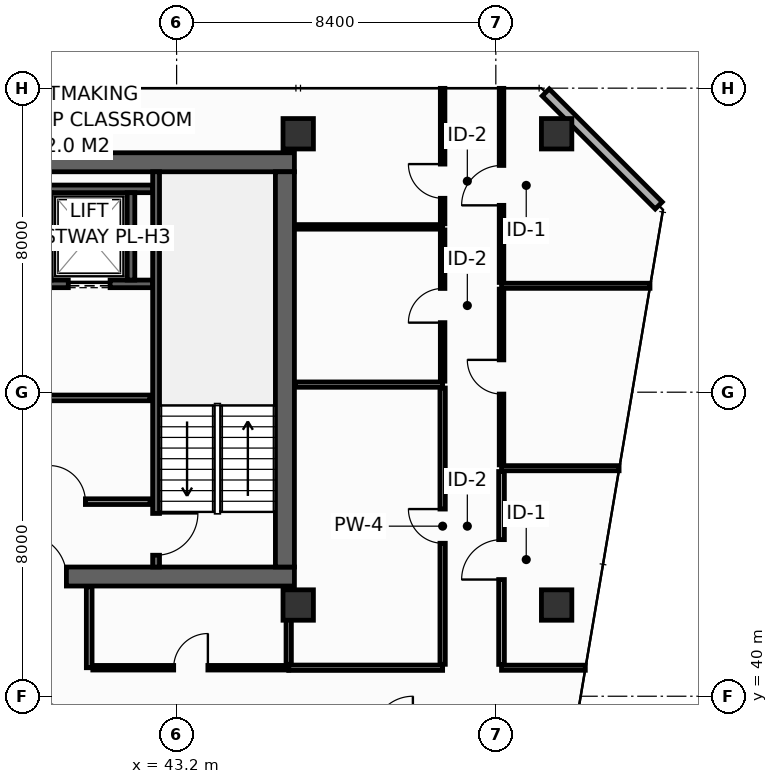
"""IFC4 building model, lengths in metres.
Left out: names, types, materials, properties, quantities, classifications, styles, units other than length and angle.
Written with IfcOpenShell. Run it as: python <this file> out.ifc"""

import sys

from ifc_helpers import new_model, si_unit, direction, frame, frame_2d, origin, origin_2d, place, context, subcontext, project, spatial, rectangle, hollow_rectangle, extrude, element, fill, save


model = new_model("IFC4")
c1 = context("Model", 3, precision=1e-05, world=origin(), true_north=direction((0.0, 1.0)))
c2 = subcontext(c1, "Body", "Model", "MODEL_VIEW")
j1 = project(units=[si_unit("LENGTHUNIT", "METRE"), si_unit("PLANEANGLEUNIT", "RADIAN")], contexts=[c1])
p1 = place(None, origin())
s1 = spatial("IfcSite", under=j1, at=p1, CompositionType="ELEMENT")
p2 = place(p1, origin())
s2 = spatial("IfcBuilding", under=s1, at=p2, CompositionType="ELEMENT")
p3 = place(p2, frame((0.0, 0.0, 220.8)))
s3 = spatial("IfcBuildingStorey", under=s2, at=p3, CompositionType="ELEMENT", Elevation=220.8)
p4 = place(p3, frame((13.6, 43.15, 0.0), z_axis=(0.0, 0.0, 1.0), x_axis=(1.0, 0.0, 0.0)))
e1 = element("IfcWall", 1, at=p4, inside=s3, PredefinedType="SHEAR", context=c2, shape_type="SweptSolid", body=[
    extrude(rectangle(XDim=32.7, YDim=0.5, at=frame_2d((16.35, 0.0))), origin(), (0.0, 0.0, 1.0), 3.35),
])
p5 = place(p4, frame((5.4, 0.0, 0.0)))
e2 = element("IfcOpeningElement", 2, at=p5, cuts=e1, PredefinedType="OPENING", context=c2, shape_type="SweptSolid", body=[
    extrude(rectangle(XDim=1.1, YDim=2.15, at=frame_2d((0.55, 1.075))), frame((0.0, 0.26, 0.0), z_axis=(0.0, -1.0, 0.0), x_axis=(1.0, 0.0, 0.0)), (0.0, 0.0, 1.0), 0.52),
])
p6 = place(p4, frame((25.6, 0.0, 0.0)))
e3 = element("IfcOpeningElement", 3, at=p6, cuts=e1, PredefinedType="OPENING", context=c2, shape_type="SweptSolid", body=[
    extrude(rectangle(XDim=1.1, YDim=2.15, at=frame_2d((0.55, 1.075))), frame((0.0, 0.26, 0.0), z_axis=(0.0, -1.0, 0.0), x_axis=(1.0, 0.0, 0.0)), (0.0, 0.0, 1.0), 0.52),
])
p7 = place(p3, frame((13.6, 54.05, 0.0), z_axis=(0.0, 0.0, 1.0), x_axis=(1.0, 0.0, 0.0)))
e4 = element("IfcWall", 4, at=p7, inside=s3, PredefinedType="SHEAR", context=c2, shape_type="SweptSolid", body=[
    extrude(rectangle(XDim=32.7, YDim=0.5, at=frame_2d((16.35, 0.0))), origin(), (0.0, 0.0, 1.0), 3.35),
])
p8 = place(p3, frame((46.05, 43.4, 0.0), z_axis=(0.0, 0.0, 1.0), x_axis=(0.0, 1.0, 0.0)))
e5 = element("IfcWall", 5, at=p8, inside=s3, PredefinedType="SHEAR", context=c2, shape_type="SweptSolid", body=[
    extrude(rectangle(XDim=10.4, YDim=0.5, at=frame_2d((5.2, 0.0))), origin(), (0.0, 0.0, 1.0), 3.35),
])
for number, where, z_axis, x_axis in (
    (6, (46.4, 54.8, 0.0), (0.0, 0.0, 1.0), (1.0, 0.0, 0.0)),
    (7, (53.2, 54.8, 0.0), (0.0, 0.0, 1.0), (1.0, 0.0, 0.0)),
    (8, (46.4, 42.4, 0.0), (0.0, 0.0, 1.0), (1.0, 0.0, 0.0)),
    (9, (53.2, 42.4, 0.0), (0.0, 0.0, 1.0), (1.0, 0.0, 0.0)),
):
    element("IfcColumn", number, at=place(p3, frame(where, z_axis=z_axis, x_axis=x_axis)), inside=s3, PredefinedType="COLUMN", context=c2, shape_type="SweptSolid", body=[
        extrude(hollow_rectangle(XDim=0.8, YDim=0.8, WallThickness=0.036, at=origin_2d()), origin(), (0.0, 0.0, 1.0), 3.8),
    ])
p9 = place(p3, frame((39.525, 50.85, 0.0), z_axis=(0.0, 0.0, 1.0), x_axis=(1.0, 0.0, 0.0)))
e10 = element("IfcWall", 10, at=p9, inside=s3, PredefinedType="SHEAR", context=c2, shape_type="SweptSolid", body=[
    extrude(rectangle(XDim=3.045, YDim=0.2, at=frame_2d((1.522, 0.0))), origin(), (0.0, 0.0, 1.0), 3.35),
])
p10 = place(p9, frame((0.825, 0.0, 0.0)))
e11 = element("IfcOpeningElement", 11, at=p10, cuts=e10, PredefinedType="OPENING", context=c2, shape_type="SweptSolid", body=[
    extrude(rectangle(XDim=1.1, YDim=2.2, at=frame_2d((0.55, 1.1))), frame((0.0, 0.11, 0.0), z_axis=(0.0, -1.0, 0.0), x_axis=(1.0, 0.0, 0.0)), (0.0, 0.0, 1.0), 0.22),
])
p11 = place(p3, frame((39.525, 53.35, 0.0), z_axis=(0.0, 0.0, 1.0), x_axis=(1.0, 0.0, 0.0)))
e12 = element("IfcWall", 12, at=p11, inside=s3, PredefinedType="SHEAR", context=c2, shape_type="SweptSolid", body=[
    extrude(rectangle(XDim=3.045, YDim=0.2, at=frame_2d((1.522, 0.0))), origin(), (0.0, 0.0, 1.0), 3.35),
])
p12 = place(p3, frame((42.0, 50.95, 0.0), z_axis=(0.0, 0.0, 1.0), x_axis=(0.0, 1.0, 0.0)))
e13 = element("IfcWall", 13, at=p12, inside=s3, PredefinedType="SHEAR", context=c2, shape_type="SweptSolid", body=[
    extrude(rectangle(XDim=2.3, YDim=0.2, at=frame_2d((1.15, 0.0))), origin(), (0.0, 0.0, 1.0), 3.35),
])
p13 = place(p3, frame((42.66, 53.8, 0.0), z_axis=(0.0, 0.0, 1.0), x_axis=(0.0, -1.0, 0.0)))
e14 = element("IfcWall", 14, at=p13, inside=s3, PredefinedType="SHEAR", context=c2, shape_type="SweptSolid", body=[
    extrude(rectangle(XDim=10.4, YDim=0.18, at=frame_2d((5.2, 0.0))), origin(), (0.0, 0.0, 1.0), 3.35),
])
p14 = place(p13, frame((8.99, 0.0, 0.0)))
e15 = element("IfcOpeningElement", 15, at=p14, cuts=e14, PredefinedType="OPENING", context=c2, shape_type="SweptSolid", body=[
    extrude(rectangle(XDim=1.1, YDim=2.15, at=frame_2d((0.55, 1.075))), frame((0.0, 0.1, 0.0), z_axis=(0.0, -1.0, 0.0), x_axis=(1.0, 0.0, 0.0)), (0.0, 0.0, 1.0), 0.2),
])
p15 = place(p3, frame((34.05, 45.12, 0.0), z_axis=(0.0, 0.0, 1.0), x_axis=(1.0, 0.0, 0.0)))
e16 = element("IfcWall", 16, at=p15, inside=s3, PredefinedType="PARTITIONING", context=c2, shape_type="SweptSolid", body=[
    extrude(rectangle(XDim=8.45, YDim=0.15, at=frame_2d((4.225, 0.0))), origin(), (0.0, 0.0, 1.0), 3.35),
])
p16 = place(p15, frame((1.5, 0.0, 0.0)))
e17 = element("IfcOpeningElement", 17, at=p16, cuts=e16, PredefinedType="OPENING", context=c2, shape_type="SweptSolid", body=[
    extrude(rectangle(XDim=0.95, YDim=2.15, at=frame_2d((0.475, 1.075))), frame((0.0, 0.085, 0.0), z_axis=(0.0, -1.0, 0.0), x_axis=(1.0, 0.0, 0.0)), (0.0, 0.0, 1.0), 0.17),
])
p17 = place(p15, frame((5.8, 0.0, 0.0)))
e18 = element("IfcOpeningElement", 18, at=p17, cuts=e16, PredefinedType="OPENING", context=c2, shape_type="SweptSolid", body=[
    extrude(rectangle(XDim=0.95, YDim=2.15, at=frame_2d((0.475, 1.075))), frame((0.0, 0.085, 0.0), z_axis=(0.0, -1.0, 0.0), x_axis=(1.0, 0.0, 0.0)), (0.0, 0.0, 1.0), 0.17),
])
p18 = place(p3, frame((34.05, 47.85, 0.0), z_axis=(0.0, 0.0, 1.0), x_axis=(1.0, 0.0, 0.0)))
e19 = element("IfcWall", 19, at=p18, inside=s3, PredefinedType="PARTITIONING", context=c2, shape_type="SweptSolid", body=[
    extrude(rectangle(XDim=8.45, YDim=0.15, at=frame_2d((4.225, 0.0))), origin(), (0.0, 0.0, 1.0), 3.35),
])
p19 = place(p3, frame((55.887, 52.913, 0.0), z_axis=(0.0, 0.0, 1.0), x_axis=(-0.707106781187, 0.707106781187, 0.0)))
e20 = element("IfcWall", 20, at=p19, inside=s3, PredefinedType="STANDARD", context=c2, shape_type="SweptSolid", body=[
    extrude(rectangle(XDim=4.206, YDim=0.26, at=frame_2d((2.103, 0.0))), origin(), (0.0, 0.0, 1.0), 3.35),
])
p20 = place(p3, frame((46.15, 40.75, 0.0), z_axis=(0.0, 0.0, 1.0), x_axis=(1.0, 0.0, 0.0)))
e21 = element("IfcWall", 21, at=p20, inside=s3, PredefinedType="PARTITIONING", context=c2, shape_type="SweptSolid", body=[
    extrude(rectangle(XDim=4.05, YDim=0.14, at=frame_2d((2.025, 0.0))), origin(), (0.0, 0.0, 1.0), 3.35),
])
p21 = place(p3, frame((46.15, 40.84, 0.0), z_axis=(0.0, 0.0, 1.0), x_axis=(0.0, 1.0, 0.0)))
e22 = element("IfcWall", 22, at=p21, inside=s3, PredefinedType="PARTITIONING", context=c2, shape_type="SweptSolid", body=[
    extrude(rectangle(XDim=2.04, YDim=0.14, at=frame_2d((1.02, 0.0))), origin(), (0.0, 0.0, 1.0), 3.35),
])
p22 = place(p3, frame((46.32, 48.2, 0.0), z_axis=(0.0, 0.0, 1.0), x_axis=(1.0, 0.0, 0.0)))
e23 = element("IfcWall", 23, at=p22, inside=s3, PredefinedType="PARTITIONING", context=c2, shape_type="SweptSolid", body=[
    extrude(rectangle(XDim=3.88, YDim=0.14, at=frame_2d((1.94, 0.0))), origin(), (0.0, 0.0, 1.0), 3.35),
])
p23 = place(p3, frame((50.2, 40.84, 0.0), z_axis=(0.0, 0.0, 1.0), x_axis=(0.0, 1.0, 0.0)))
e24 = element("IfcWall", 24, at=p23, inside=s3, PredefinedType="PARTITIONING", context=c2, shape_type="SweptSolid", body=[
    extrude(rectangle(XDim=7.27, YDim=0.14, at=frame_2d((3.635, 0.0))), origin(), (0.0, 0.0, 1.0), 2.635),
])
p24 = place(p23, frame((3.185, 0.0, 0.0)))
e25 = element("IfcOpeningElement", 25, at=p24, cuts=e24, PredefinedType="OPENING", context=c2, shape_type="SweptSolid", body=[
    extrude(rectangle(XDim=0.9, YDim=2.1, at=frame_2d((0.45, 1.05))), frame((0.0, 0.08, 0.0), z_axis=(0.0, -1.0, 0.0), x_axis=(1.0, 0.0, 0.0)), (0.0, 0.0, 1.0), 0.16),
])
p25 = place(p3, frame((46.32, 52.35, 0.0), z_axis=(0.0, 0.0, 1.0), x_axis=(1.0, 0.0, 0.0)))
e26 = element("IfcWall", 26, at=p25, inside=s3, PredefinedType="PARTITIONING", context=c2, shape_type="SweptSolid", body=[
    extrude(rectangle(XDim=3.88, YDim=0.12, at=frame_2d((1.94, 0.0))), origin(), (0.0, 0.0, 1.0), 3.35),
])
p26 = place(p3, frame((50.2, 48.29, 0.0), z_axis=(0.0, 0.0, 1.0), x_axis=(0.0, 1.0, 0.0)))
e27 = element("IfcWall", 27, at=p26, inside=s3, PredefinedType="PARTITIONING", context=c2, shape_type="SweptSolid", body=[
    extrude(rectangle(XDim=3.98, YDim=0.12, at=frame_2d((1.99, 0.0))), origin(), (0.0, 0.0, 1.0), 3.35),
])
p27 = place(p26, frame((1.54, 0.0, 0.0)))
e28 = element("IfcOpeningElement", 28, at=p27, cuts=e27, PredefinedType="OPENING", context=c2, shape_type="SweptSolid", body=[
    extrude(rectangle(XDim=0.9, YDim=2.1, at=frame_2d((0.45, 1.05))), frame((0.0, 0.07, 0.0), z_axis=(0.0, -1.0, 0.0), x_axis=(1.0, 0.0, 0.0)), (0.0, 0.0, 1.0), 0.14),
])
p28 = place(p3, frame((50.2, 52.43, 0.0), z_axis=(0.0, 0.0, 1.0), x_axis=(0.0, 1.0, 0.0)))
e29 = element("IfcWall", 29, at=p28, inside=s3, PredefinedType="PARTITIONING", context=c2, shape_type="SweptSolid", body=[
    extrude(rectangle(XDim=3.565, YDim=0.12, at=frame_2d((1.783, 0.0))), origin(), (0.0, 0.0, 1.0), 2.735),
])
p29 = place(p28, frame((0.672, 0.0, 0.0)))
e30 = element("IfcOpeningElement", 30, at=p29, cuts=e29, PredefinedType="OPENING", context=c2, shape_type="SweptSolid", body=[
    extrude(rectangle(XDim=0.9, YDim=2.1, at=frame_2d((0.45, 1.05))), frame((0.0, 0.07, 0.0), z_axis=(0.0, -1.0, 0.0), x_axis=(1.0, 0.0, 0.0)), (0.0, 0.0, 1.0), 0.14),
])
p30 = place(p3, frame((51.75, 40.75, 0.0), z_axis=(0.0, 0.0, 1.0), x_axis=(1.0, 0.0, 0.0)))
e31 = element("IfcWall", 31, at=p30, inside=s3, PredefinedType="PARTITIONING", context=c2, shape_type="SweptSolid", body=[
    extrude(rectangle(XDim=2.205, YDim=0.135, at=frame_2d((1.103, 0.0))), origin(), (0.0, 0.0, 1.0), 2.835),
])
p31 = place(p3, frame((51.75, 46.0, 0.0), z_axis=(0.0, 0.0, 1.0), x_axis=(1.0, 0.0, 0.0)))
e32 = element("IfcWall", 32, at=p31, inside=s3, PredefinedType="PARTITIONING", context=c2, shape_type="SweptSolid", body=[
    extrude(rectangle(XDim=3.094, YDim=0.135, at=frame_2d((1.547, 0.0))), origin(), (0.0, 0.0, 1.0), 2.635),
])
p32 = place(p3, frame((51.75, 50.8, 0.0), z_axis=(0.0, 0.0, 1.0), x_axis=(1.0, 0.0, 0.0)))
e33 = element("IfcWall", 33, at=p32, inside=s3, PredefinedType="PARTITIONING", context=c2, shape_type="SweptSolid", body=[
    extrude(rectangle(XDim=3.906, YDim=0.135, at=frame_2d((1.953, 0.0))), origin(), (0.0, 0.0, 1.0), 2.635),
])
p33 = place(p3, frame((51.75, 40.837, 0.0), z_axis=(0.0, 0.0, 1.0), x_axis=(0.0, 1.0, 0.0)))
e34 = element("IfcWall", 34, at=p33, inside=s3, PredefinedType="PARTITIONING", context=c2, shape_type="SweptSolid", body=[
    extrude(rectangle(XDim=5.075, YDim=0.15, at=frame_2d((2.538, 0.0))), origin(), (0.0, 0.0, 1.0), 2.635),
])
p34 = place(p33, frame((2.233, 0.0, 0.0)))
e35 = element("IfcOpeningElement", 35, at=p34, cuts=e34, PredefinedType="OPENING", context=c2, shape_type="SweptSolid", body=[
    extrude(rectangle(XDim=1.05, YDim=2.15, at=frame_2d((0.525, 1.075))), frame((0.0, 0.085, 0.0), z_axis=(0.0, -1.0, 0.0), x_axis=(1.0, 0.0, 0.0)), (0.0, 0.0, 1.0), 0.17),
])
p35 = place(p3, frame((51.75, 46.087, 0.0), z_axis=(0.0, 0.0, 1.0), x_axis=(0.0, 1.0, 0.0)))
e36 = element("IfcWall", 36, at=p35, inside=s3, PredefinedType="PARTITIONING", context=c2, shape_type="SweptSolid", body=[
    extrude(rectangle(XDim=4.625, YDim=0.12, at=frame_2d((2.312, 0.0))), origin(), (0.0, 0.0, 1.0), 3.35),
])
p36 = place(p35, frame((1.863, 0.0, 0.0)))
e37 = element("IfcOpeningElement", 37, at=p36, cuts=e36, PredefinedType="OPENING", context=c2, shape_type="SweptSolid", body=[
    extrude(rectangle(XDim=0.9, YDim=2.1, at=frame_2d((0.45, 1.05))), frame((0.0, 0.07, 0.0), z_axis=(0.0, -1.0, 0.0), x_axis=(1.0, 0.0, 0.0)), (0.0, 0.0, 1.0), 0.14),
])
p37 = place(p3, frame((51.75, 50.887, 0.0), z_axis=(0.0, 0.0, 1.0), x_axis=(0.0, 1.0, 0.0)))
e38 = element("IfcWall", 38, at=p37, inside=s3, PredefinedType="PARTITIONING", context=c2, shape_type="SweptSolid", body=[
    extrude(rectangle(XDim=5.108, YDim=0.12, at=frame_2d((2.554, 0.0))), origin(), (0.0, 0.0, 1.0), 2.735),
])
p38 = place(p37, frame((2.029, 0.0, 0.0)))
e39 = element("IfcOpeningElement", 39, at=p38, cuts=e38, PredefinedType="OPENING", context=c2, shape_type="SweptSolid", body=[
    extrude(rectangle(XDim=1.05, YDim=2.15, at=frame_2d((0.525, 1.075))), frame((0.0, 0.07, 0.0), z_axis=(0.0, -1.0, 0.0), x_axis=(1.0, 0.0, 0.0)), (0.0, 0.0, 1.0), 0.14),
])
p39 = place(p3, frame((40.9, 40.75, 0.0), z_axis=(0.0, 0.0, 1.0), x_axis=(0.0, 1.0, 0.0)))
e40 = element("IfcWall", 40, at=p39, inside=s3, PredefinedType="PARTITIONING", context=c2, shape_type="SweptSolid", body=[
    extrude(rectangle(XDim=2.13, YDim=0.15, at=frame_2d((1.065, 0.0))), origin(), (0.0, 0.0, 1.0), 3.35),
])
p40 = place(p3, frame((40.995, 40.75, 0.0), z_axis=(0.0, 0.0, 1.0), x_axis=(1.0, 0.0, 0.0)))
e41 = element("IfcWall", 41, at=p40, inside=s3, PredefinedType="PARTITIONING", context=c2, shape_type="SweptSolid", body=[
    extrude(rectangle(XDim=5.155, YDim=0.12, at=frame_2d((2.577, 0.0))), origin(), (0.0, 0.0, 1.0), 3.35),
])
p41 = place(p40, frame((2.128, 0.0, 0.0)))
e42 = element("IfcOpeningElement", 42, at=p41, cuts=e41, PredefinedType="OPENING", context=c2, shape_type="SweptSolid", body=[
    extrude(rectangle(XDim=0.9, YDim=2.1, at=frame_2d((0.45, 1.05))), frame((0.0, 0.07, 0.0), z_axis=(0.0, -1.0, 0.0), x_axis=(1.0, 0.0, 0.0)), (0.0, 0.0, 1.0), 0.14),
])
p42 = place(p10, origin())
e43 = element("IfcDoor", 43, at=p42, inside=s3, OperationType="SLIDING_TO_LEFT", PredefinedType="DOOR", context=c2, shape_type="SweptSolid", body=[
    extrude(rectangle(XDim=1.1, YDim=2.2, at=frame_2d((0.55, 1.1))), frame((0.0, 0.025, 0.0), z_axis=(0.0, -1.0, 0.0), x_axis=(1.0, 0.0, 0.0)), (0.0, 0.0, 1.0), 0.05),
])
fill(e11, e43)
p43 = place(p14, origin())
e44 = element("IfcDoor", 44, at=p43, inside=s3, OperationType="SINGLE_SWING_LEFT", PredefinedType="DOOR", context=c2, shape_type="SweptSolid", body=[
    extrude(rectangle(XDim=1.1, YDim=2.15, at=frame_2d((0.55, 1.075))), frame((0.0, 0.025, 0.0), z_axis=(0.0, -1.0, 0.0), x_axis=(1.0, 0.0, 0.0)), (0.0, 0.0, 1.0), 0.05),
])
fill(e15, e44)
p44 = place(p6, origin())
e45 = element("IfcDoor", 45, at=p44, inside=s3, OperationType="SINGLE_SWING_LEFT", PredefinedType="DOOR", context=c2, shape_type="SweptSolid", body=[
    extrude(rectangle(XDim=1.1, YDim=2.15, at=frame_2d((0.55, 1.075))), frame((0.0, 0.025, 0.0), z_axis=(0.0, -1.0, 0.0), x_axis=(1.0, 0.0, 0.0)), (0.0, 0.0, 1.0), 0.05),
])
fill(e3, e45)
p45 = place(p17, origin())
e46 = element("IfcDoor", 46, at=p45, inside=s3, OperationType="SINGLE_SWING_LEFT", PredefinedType="DOOR", context=c2, shape_type="SweptSolid", body=[
    extrude(rectangle(XDim=0.95, YDim=2.15, at=frame_2d((0.475, 1.075))), frame((0.0, 0.025, 0.0), z_axis=(0.0, -1.0, 0.0), x_axis=(1.0, 0.0, 0.0)), (0.0, 0.0, 1.0), 0.05),
])
fill(e18, e46)
p46 = place(p24, origin())
e47 = element("IfcDoor", 47, at=p46, inside=s3, OperationType="SINGLE_SWING_RIGHT", PredefinedType="DOOR", context=c2, shape_type="SweptSolid", body=[
    extrude(rectangle(XDim=0.9, YDim=2.1, at=frame_2d((0.45, 1.05))), frame((0.0, 0.025, 0.0), z_axis=(0.0, -1.0, 0.0), x_axis=(1.0, 0.0, 0.0)), (0.0, 0.0, 1.0), 0.05),
])
fill(e25, e47)
p47 = place(p27, origin())
e48 = element("IfcDoor", 48, at=p47, inside=s3, OperationType="SINGLE_SWING_LEFT", PredefinedType="DOOR", context=c2, shape_type="SweptSolid", body=[
    extrude(rectangle(XDim=0.9, YDim=2.1, at=frame_2d((0.45, 1.05))), frame((0.0, 0.025, 0.0), z_axis=(0.0, -1.0, 0.0), x_axis=(1.0, 0.0, 0.0)), (0.0, 0.0, 1.0), 0.05),
])
fill(e28, e48)
p48 = place(p29, origin())
e49 = element("IfcDoor", 49, at=p48, inside=s3, OperationType="SINGLE_SWING_RIGHT", PredefinedType="DOOR", context=c2, shape_type="SweptSolid", body=[
    extrude(rectangle(XDim=0.9, YDim=2.1, at=frame_2d((0.45, 1.05))), frame((0.0, 0.025, 0.0), z_axis=(0.0, -1.0, 0.0), x_axis=(1.0, 0.0, 0.0)), (0.0, 0.0, 1.0), 0.05),
])
fill(e30, e49)
p49 = place(p34, origin())
e50 = element("IfcDoor", 50, at=p49, inside=s3, OperationType="SINGLE_SWING_LEFT", PredefinedType="DOOR", context=c2, shape_type="SweptSolid", body=[
    extrude(rectangle(XDim=1.05, YDim=2.15, at=frame_2d((0.525, 1.075))), frame((0.0, 0.025, 0.0), z_axis=(0.0, -1.0, 0.0), x_axis=(1.0, 0.0, 0.0)), (0.0, 0.0, 1.0), 0.05),
])
fill(e35, e50)
p50 = place(p36, origin())
e51 = element("IfcDoor", 51, at=p50, inside=s3, OperationType="SINGLE_SWING_RIGHT", PredefinedType="DOOR", context=c2, shape_type="SweptSolid", body=[
    extrude(rectangle(XDim=0.9, YDim=2.1, at=frame_2d((0.45, 1.05))), frame((0.0, 0.025, 0.0), z_axis=(0.0, -1.0, 0.0), x_axis=(1.0, 0.0, 0.0)), (0.0, 0.0, 1.0), 0.05),
])
fill(e37, e51)
p51 = place(p38, origin())
e52 = element("IfcDoor", 52, at=p51, inside=s3, OperationType="SINGLE_SWING_LEFT", PredefinedType="DOOR", context=c2, shape_type="SweptSolid", body=[
    extrude(rectangle(XDim=1.05, YDim=2.15, at=frame_2d((0.525, 1.075))), frame((0.0, 0.025, 0.0), z_axis=(0.0, -1.0, 0.0), x_axis=(1.0, 0.0, 0.0)), (0.0, 0.0, 1.0), 0.05),
])
fill(e39, e52)
p52 = place(p41, origin())
e53 = element("IfcDoor", 53, at=p52, inside=s3, OperationType="SINGLE_SWING_RIGHT", PredefinedType="DOOR", context=c2, shape_type="SweptSolid", body=[
    extrude(rectangle(XDim=0.9, YDim=2.1, at=frame_2d((0.45, 1.05))), frame((0.0, 0.025, 0.0), z_axis=(0.0, -1.0, 0.0), x_axis=(1.0, 0.0, 0.0)), (0.0, 0.0, 1.0), 0.05),
])
fill(e42, e53)
save(model, sys.argv[1])
